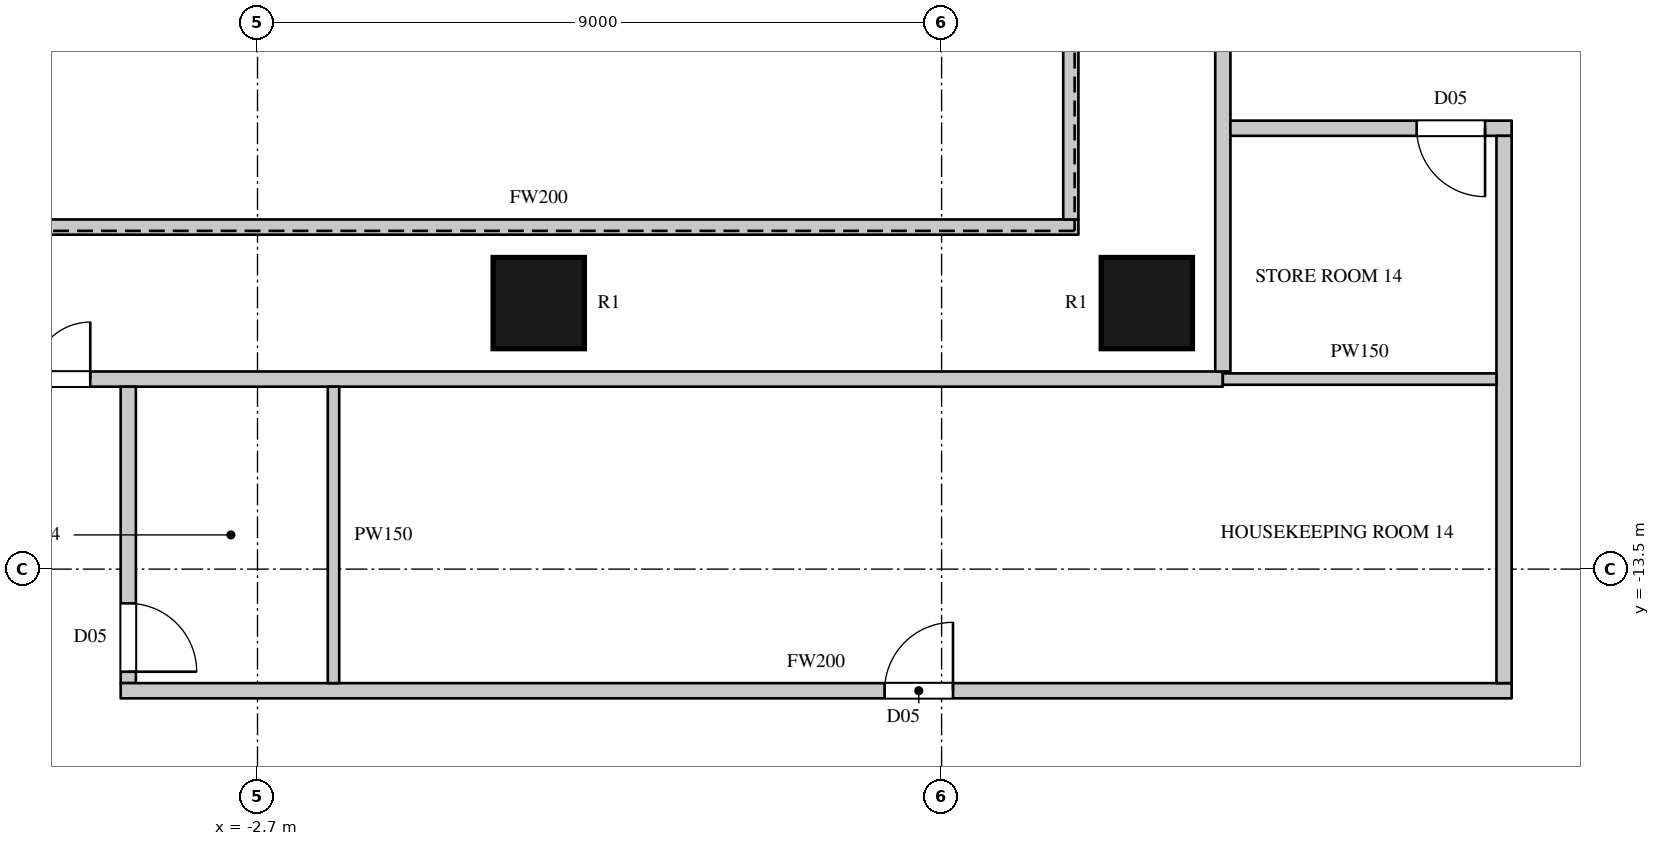
"""IFC4 building model, lengths in metres.
Left out: names, types, materials, properties, quantities, classifications, styles, units other than length and angle.
Written with IfcOpenShell. Run it as: python <this file> out.ifc"""

import sys

from ifc_helpers import new_model, si_unit, direction, frame, frame_2d, origin, origin_2d, place, context, subcontext, project, spatial, rectangle, circle, extrude, element, fill, save


model = new_model("IFC4")
c1 = context("Model", 3, precision=1e-05, world=origin(), true_north=direction((0.0, 1.0)))
c2 = subcontext(c1, "Body", "Model", "MODEL_VIEW")
j1 = project(units=[si_unit("LENGTHUNIT", "METRE"), si_unit("PLANEANGLEUNIT", "RADIAN")], contexts=[c1])
p1 = place(None, origin())
s1 = spatial("IfcSite", under=j1, at=p1, CompositionType="ELEMENT")
p2 = place(p1, origin())
s2 = spatial("IfcBuilding", under=s1, at=p2, CompositionType="ELEMENT")
p3 = place(p2, frame((0.0, 0.0, 80.7)))
s3 = spatial("IfcBuildingStorey", under=s2, at=p3, CompositionType="ELEMENT", Elevation=80.7)
for number, where, z_axis, x_axis in (
    (1, (1.0, -10.0, 0.0), (0.0, 0.0, 1.0), (1.0, 0.0, 0.0)),
    (2, (9.0, -10.0, 0.0), (0.0, 0.0, 1.0), (1.0, 0.0, 0.0)),
):
    element("IfcColumn", number, at=place(p3, frame(where, z_axis=z_axis, x_axis=x_axis)), inside=s3, PredefinedType="COLUMN", context=c2, shape_type="SweptSolid", body=[
        extrude(circle(Radius=0.6, at=origin_2d()), origin(), (0.0, 0.0, 1.0), 3.6),
    ])
p4 = place(p3, frame((-8.1, -11.0, 0.0), z_axis=(0.0, 0.0, 1.0), x_axis=(1.0, 0.0, 0.0)))
e3 = element("IfcWall", 3, at=p4, inside=s3, PredefinedType="PARTITIONING", context=c2, shape_type="SweptSolid", body=[
    extrude(rectangle(XDim=18.1, YDim=0.2, at=frame_2d((9.05, 0.0))), origin(), (0.0, 0.0, 1.0), 3.3),
])
p5 = place(p4, frame((1.7, 0.0, 0.0)))
e4 = element("IfcOpeningElement", 4, at=p5, cuts=e3, PredefinedType="OPENING", context=c2, shape_type="SweptSolid", body=[
    extrude(rectangle(XDim=1.5, YDim=2.2, at=frame_2d((0.75, 1.1))), frame((0.0, 0.11, 0.0), z_axis=(0.0, -1.0, 0.0), x_axis=(1.0, 0.0, 0.0)), (0.0, 0.0, 1.0), 0.22),
])
p6 = place(p3, frame((-6.1, -9.0, 0.0), z_axis=(0.0, 0.0, 1.0), x_axis=(1.0, 0.0, 0.0)))
e5 = element("IfcWall", 5, at=p6, inside=s3, PredefinedType="PARTITIONING", context=c2, shape_type="SweptSolid", body=[
    extrude(rectangle(XDim=14.2, YDim=0.2, at=frame_2d((7.1, 0.0))), origin(), (0.0, 0.0, 1.0), 3.3),
])
p7 = place(p3, frame((-4.4, -15.0, 0.0), z_axis=(0.0, 0.0, 1.0), x_axis=(0.0, 1.0, 0.0)))
e6 = element("IfcWall", 6, at=p7, inside=s3, PredefinedType="PARTITIONING", context=c2, shape_type="SweptSolid", body=[
    extrude(rectangle(XDim=3.9, YDim=0.2, at=frame_2d((1.95, 0.0))), origin(), (0.0, 0.0, 1.0), 3.3),
])
p8 = place(p7, frame((0.15, 0.0, 0.0)))
e7 = element("IfcOpeningElement", 7, at=p8, cuts=e6, PredefinedType="OPENING", context=c2, shape_type="SweptSolid", body=[
    extrude(rectangle(XDim=0.9, YDim=2.2, at=frame_2d((0.45, 1.1))), frame((0.0, 0.11, 0.0), z_axis=(0.0, -1.0, 0.0), x_axis=(1.0, 0.0, 0.0)), (0.0, 0.0, 1.0), 0.22),
])
p9 = place(p3, frame((-4.5, -15.1, 0.0), z_axis=(0.0, 0.0, 1.0), x_axis=(1.0, 0.0, 0.0)))
e8 = element("IfcWall", 8, at=p9, inside=s3, PredefinedType="PARTITIONING", context=c2, shape_type="SweptSolid", body=[
    extrude(rectangle(XDim=18.3, YDim=0.2, at=frame_2d((9.15, 0.0))), origin(), (0.0, 0.0, 1.0), 3.3),
])
p10 = place(p9, frame((10.05, 0.0, 0.0)))
e9 = element("IfcOpeningElement", 9, at=p10, cuts=e8, PredefinedType="OPENING", context=c2, shape_type="SweptSolid", body=[
    extrude(rectangle(XDim=0.9, YDim=2.2, at=frame_2d((0.45, 1.1))), frame((0.0, 0.11, 0.0), z_axis=(0.0, -1.0, 0.0), x_axis=(1.0, 0.0, 0.0)), (0.0, 0.0, 1.0), 0.22),
])
p11 = place(p3, frame((8.0, -8.9, 0.0), z_axis=(0.0, 0.0, 1.0), x_axis=(0.0, 1.0, 0.0)))
e10 = element("IfcWall", 10, at=p11, inside=s3, PredefinedType="PARTITIONING", context=c2, shape_type="SweptSolid", body=[
    extrude(rectangle(XDim=17.8, YDim=0.2, at=frame_2d((8.9, 0.0))), origin(), (0.0, 0.0, 1.0), 3.3),
])
p12 = place(p3, frame((10.0, -10.9, 0.0), z_axis=(0.0, 0.0, 1.0), x_axis=(0.0, 1.0, 0.0)))
e11 = element("IfcWall", 11, at=p12, inside=s3, PredefinedType="PARTITIONING", context=c2, shape_type="SweptSolid", body=[
    extrude(rectangle(XDim=21.8, YDim=0.2, at=frame_2d((10.9, 0.0))), origin(), (0.0, 0.0, 1.0), 3.3),
])
p13 = place(p12, frame((15.9, 0.0, 0.0)))
e12 = element("IfcOpeningElement", 12, at=p13, cuts=e11, PredefinedType="OPENING", context=c2, shape_type="SweptSolid", body=[
    extrude(rectangle(XDim=1.5, YDim=2.2, at=frame_2d((0.75, 1.1))), frame((0.0, 0.11, 0.0), z_axis=(0.0, -1.0, 0.0), x_axis=(1.0, 0.0, 0.0)), (0.0, 0.0, 1.0), 0.22),
])
p14 = place(p12, frame((8.75, 0.0, 0.0)))
e13 = element("IfcOpeningElement", 13, at=p14, cuts=e11, PredefinedType="OPENING", context=c2, shape_type="SweptSolid", body=[
    extrude(rectangle(XDim=1.5, YDim=2.2, at=frame_2d((0.75, 1.1))), frame((0.0, 0.11, 0.0), z_axis=(0.0, -1.0, 0.0), x_axis=(1.0, 0.0, 0.0)), (0.0, 0.0, 1.0), 0.22),
])
p15 = place(p3, frame((10.1, -7.7, 0.0), z_axis=(0.0, 0.0, 1.0), x_axis=(1.0, 0.0, 0.0)))
e14 = element("IfcWall", 14, at=p15, inside=s3, PredefinedType="PARTITIONING", context=c2, shape_type="SweptSolid", body=[
    extrude(rectangle(XDim=3.7, YDim=0.2, at=frame_2d((1.85, 0.0))), origin(), (0.0, 0.0, 1.0), 3.3),
])
p16 = place(p15, frame((2.45, 0.0, 0.0)))
e15 = element("IfcOpeningElement", 15, at=p16, cuts=e14, PredefinedType="OPENING", context=c2, shape_type="SweptSolid", body=[
    extrude(rectangle(XDim=0.9, YDim=2.2, at=frame_2d((0.45, 1.1))), frame((0.0, 0.11, 0.0), z_axis=(0.0, -1.0, 0.0), x_axis=(1.0, 0.0, 0.0)), (0.0, 0.0, 1.0), 0.22),
])
p17 = place(p3, frame((13.7, -15.0, 0.0), z_axis=(0.0, 0.0, 1.0), x_axis=(0.0, 1.0, 0.0)))
e16 = element("IfcWall", 16, at=p17, inside=s3, PredefinedType="PARTITIONING", context=c2, shape_type="SweptSolid", body=[
    extrude(rectangle(XDim=7.2, YDim=0.2, at=frame_2d((3.6, 0.0))), origin(), (0.0, 0.0, 1.0), 3.3),
])
p18 = place(p3, frame((-1.7, -15.0, 0.0), z_axis=(0.0, 0.0, 1.0), x_axis=(0.0, 1.0, 0.0)))
e17 = element("IfcWall", 17, at=p18, inside=s3, PredefinedType="PARTITIONING", context=c2, shape_type="SweptSolid", body=[
    extrude(rectangle(XDim=3.9, YDim=0.15, at=frame_2d((1.95, 0.0))), origin(), (0.0, 0.0, 1.0), 3.3),
])
p19 = place(p3, frame((10.0, -11.0, 0.0), z_axis=(0.0, 0.0, 1.0), x_axis=(1.0, 0.0, 0.0)))
e18 = element("IfcWall", 18, at=p19, inside=s3, PredefinedType="PARTITIONING", context=c2, shape_type="SweptSolid", body=[
    extrude(rectangle(XDim=3.6, YDim=0.15, at=frame_2d((1.8, 0.0))), origin(), (0.0, 0.0, 1.0), 3.3),
])
p20 = place(p5, origin())
e19 = element("IfcDoor", 19, at=p20, inside=s3, OperationType="DOUBLE_DOOR_SINGLE_SWING", PredefinedType="DOOR", context=c2, shape_type="SweptSolid", body=[
    extrude(rectangle(XDim=1.5, YDim=2.2, at=frame_2d((0.75, 1.1))), frame((0.0, 0.025, 0.0), z_axis=(0.0, -1.0, 0.0), x_axis=(1.0, 0.0, 0.0)), (0.0, 0.0, 1.0), 0.05),
])
fill(e4, e19)
p21 = place(p8, origin())
e20 = element("IfcDoor", 20, at=p21, inside=s3, OperationType="SINGLE_SWING_RIGHT", PredefinedType="DOOR", context=c2, shape_type="SweptSolid", body=[
    extrude(rectangle(XDim=0.9, YDim=2.2, at=frame_2d((0.45, 1.1))), frame((0.0, 0.025, 0.0), z_axis=(0.0, -1.0, 0.0), x_axis=(1.0, 0.0, 0.0)), (0.0, 0.0, 1.0), 0.05),
])
fill(e7, e20)
p22 = place(p10, origin())
e21 = element("IfcDoor", 21, at=p22, inside=s3, OperationType="SINGLE_SWING_RIGHT", PredefinedType="DOOR", context=c2, shape_type="SweptSolid", body=[
    extrude(rectangle(XDim=0.9, YDim=2.2, at=frame_2d((0.45, 1.1))), frame((0.0, 0.025, 0.0), z_axis=(0.0, -1.0, 0.0), x_axis=(1.0, 0.0, 0.0)), (0.0, 0.0, 1.0), 0.05),
])
fill(e9, e21)
p23 = place(p16, origin())
e22 = element("IfcDoor", 22, at=p23, inside=s3, OperationType="SINGLE_SWING_LEFT", PredefinedType="DOOR", context=c2, shape_type="SweptSolid", body=[
    extrude(rectangle(XDim=0.9, YDim=2.2, at=frame_2d((0.45, 1.1))), frame((0.0, 0.025, 0.0), z_axis=(0.0, -1.0, 0.0), x_axis=(1.0, 0.0, 0.0)), (0.0, 0.0, 1.0), 0.05),
])
fill(e15, e22)
save(model, sys.argv[1])
